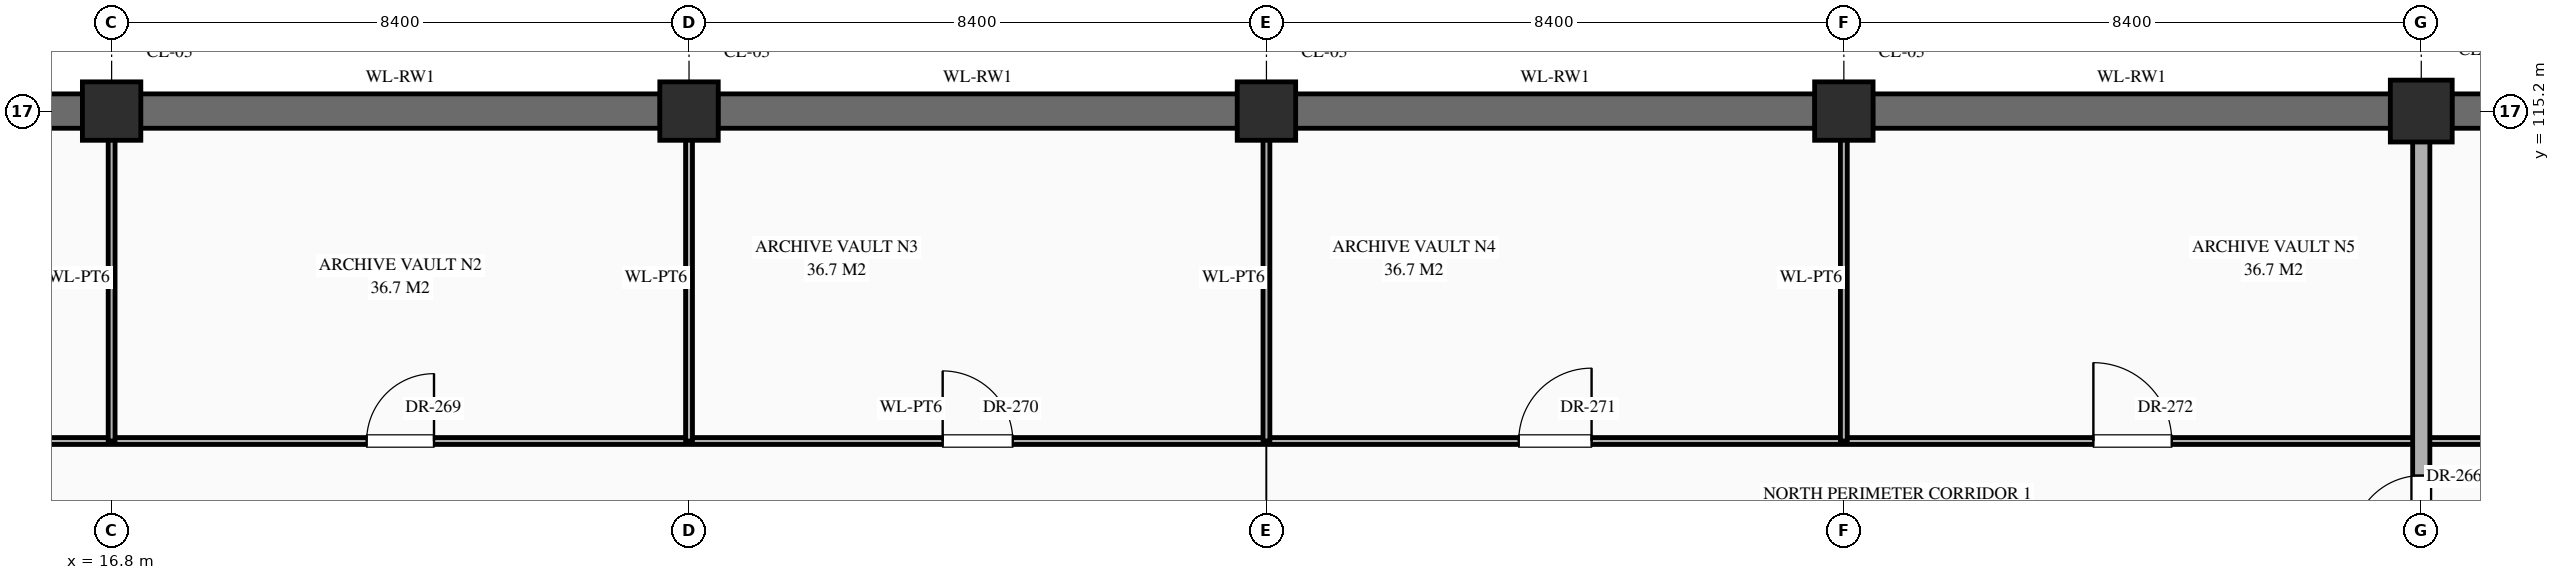
"""IFC4 building model, lengths in metres.
Left out: names, types, materials, properties, quantities, classifications, styles, units other than length and angle.
Written with IfcOpenShell. Run it as: python <this file> out.ifc"""

import sys

from ifc_helpers import new_model, si_unit, direction, frame, frame_2d, origin, origin_2d, place, context, subcontext, project, spatial, rectangle, extrude, element, fill, save


model = new_model("IFC4")
c1 = context("Model", 3, precision=1e-05, world=origin(), true_north=direction((0.0, 1.0)))
c2 = subcontext(c1, "Body", "Model", "MODEL_VIEW")
j1 = project(units=[si_unit("LENGTHUNIT", "METRE"), si_unit("PLANEANGLEUNIT", "RADIAN")], contexts=[c1])
p1 = place(None, origin())
s1 = spatial("IfcSite", under=j1, at=p1, CompositionType="ELEMENT")
p2 = place(p1, origin())
s2 = spatial("IfcBuilding", under=s1, at=p2, CompositionType="ELEMENT")
p3 = place(p2, frame((0.0, 0.0, -10.2)))
s3 = spatial("IfcBuildingStorey", under=s2, at=p3, CompositionType="ELEMENT", Elevation=-10.2)
for number, where, z_axis, x_axis in (
    (1, (16.8, 115.2, 0.0), (0.0, 0.0, 1.0), (1.0, 0.0, 0.0)),
    (2, (25.2, 115.2, 0.0), (0.0, 0.0, 1.0), (1.0, 0.0, 0.0)),
    (3, (33.6, 115.2, 0.0), (0.0, 0.0, 1.0), (1.0, 0.0, 0.0)),
    (4, (42.0, 115.2, 0.0), (0.0, 0.0, 1.0), (1.0, 0.0, 0.0)),
):
    element("IfcColumn", number, at=place(p3, frame(where, z_axis=z_axis, x_axis=x_axis)), inside=s3, PredefinedType="COLUMN", context=c2, shape_type="SweptSolid", body=[
        extrude(rectangle(XDim=0.85, YDim=0.85, at=origin_2d()), origin(), (0.0, 0.0, 1.0), 4.8),
    ])
p4 = place(p3, frame((50.4, 115.2, 0.0), z_axis=(0.0, 0.0, 1.0), x_axis=(1.0, 0.0, 0.0)))
e5 = element("IfcColumn", 5, at=p4, inside=s3, PredefinedType="COLUMN", context=c2, shape_type="SweptSolid", body=[
    extrude(rectangle(XDim=0.9, YDim=0.9, at=origin_2d()), origin(), (0.0, 0.0, 1.0), 4.8),
])
p5 = place(p3, frame((8.82, 115.2, 0.0), z_axis=(0.0, 0.0, 1.0), x_axis=(1.0, 0.0, 0.0)))
e6 = element("IfcWall", 6, at=p5, inside=s3, PredefinedType="USERDEFINED", context=c2, shape_type="SweptSolid", body=[
    extrude(rectangle(XDim=7.56, YDim=0.5, at=frame_2d((3.78, 0.0))), origin(), (0.0, 0.0, 1.0), 4.48),
])
p6 = place(p3, frame((17.22, 115.2, 0.0), z_axis=(0.0, 0.0, 1.0), x_axis=(1.0, 0.0, 0.0)))
e7 = element("IfcWall", 7, at=p6, inside=s3, PredefinedType="USERDEFINED", context=c2, shape_type="SweptSolid", body=[
    extrude(rectangle(XDim=7.56, YDim=0.5, at=frame_2d((3.78, 0.0))), origin(), (0.0, 0.0, 1.0), 4.48),
])
p7 = place(p3, frame((25.62, 115.2, 0.0), z_axis=(0.0, 0.0, 1.0), x_axis=(1.0, 0.0, 0.0)))
e8 = element("IfcWall", 8, at=p7, inside=s3, PredefinedType="USERDEFINED", context=c2, shape_type="SweptSolid", body=[
    extrude(rectangle(XDim=7.56, YDim=0.5, at=frame_2d((3.78, 0.0))), origin(), (0.0, 0.0, 1.0), 4.48),
])
p8 = place(p3, frame((34.02, 115.2, 0.0), z_axis=(0.0, 0.0, 1.0), x_axis=(1.0, 0.0, 0.0)))
e9 = element("IfcWall", 9, at=p8, inside=s3, PredefinedType="USERDEFINED", context=c2, shape_type="SweptSolid", body=[
    extrude(rectangle(XDim=7.56, YDim=0.5, at=frame_2d((3.78, 0.0))), origin(), (0.0, 0.0, 1.0), 4.48),
])
p9 = place(p3, frame((42.42, 115.2, 0.0), z_axis=(0.0, 0.0, 1.0), x_axis=(1.0, 0.0, 0.0)))
e10 = element("IfcWall", 10, at=p9, inside=s3, PredefinedType="USERDEFINED", context=c2, shape_type="SweptSolid", body=[
    extrude(rectangle(XDim=7.535, YDim=0.5, at=frame_2d((3.768, 0.0))), origin(), (0.0, 0.0, 1.0), 4.48),
])
p10 = place(p3, frame((50.845, 115.2, 0.0), z_axis=(0.0, 0.0, 1.0), x_axis=(1.0, 0.0, 0.0)))
e11 = element("IfcWall", 11, at=p10, inside=s3, PredefinedType="USERDEFINED", context=c2, shape_type="SweptSolid", body=[
    extrude(rectangle(XDim=7.51, YDim=0.5, at=frame_2d((3.755, 0.0))), origin(), (0.0, 0.0, 1.0), 4.48),
])
p11 = place(p3, frame((0.04, 110.4, 0.0), z_axis=(0.0, 0.0, 1.0), x_axis=(1.0, 0.0, 0.0)))
e12 = element("IfcWall", 12, at=p11, inside=s3, PredefinedType="STANDARD", context=c2, shape_type="SweptSolid", body=[
    extrude(rectangle(XDim=167.92, YDim=0.1, at=frame_2d((83.96, 0.0))), origin(), (0.0, 0.0, 1.0), 4.48),
])
p12 = place(p11, frame((3.54, 0.0, 0.0)))
e13 = element("IfcOpeningElement", 13, at=p12, cuts=e12, PredefinedType="OPENING", context=c2, shape_type="SweptSolid", body=[
    extrude(rectangle(XDim=1.28, YDim=2.35, at=frame_2d((0.64, 1.175))), frame((0.0, 0.062, 0.0), z_axis=(0.0, -1.0, 0.0), x_axis=(1.0, 0.0, 0.0)), (0.0, 0.0, 1.0), 0.124),
])
p13 = place(p11, frame((12.09, 0.0, 0.0)))
e14 = element("IfcOpeningElement", 14, at=p13, cuts=e12, PredefinedType="OPENING", context=c2, shape_type="SweptSolid", body=[
    extrude(rectangle(XDim=0.94, YDim=2.3, at=frame_2d((0.47, 1.15))), frame((0.0, 0.062, 0.0), z_axis=(0.0, -1.0, 0.0), x_axis=(1.0, 0.0, 0.0)), (0.0, 0.0, 1.0), 0.124),
])
p14 = place(p11, frame((20.47, 0.0, 0.0)))
e15 = element("IfcOpeningElement", 15, at=p14, cuts=e12, PredefinedType="OPENING", context=c2, shape_type="SweptSolid", body=[
    extrude(rectangle(XDim=0.98, YDim=2.35, at=frame_2d((0.49, 1.175))), frame((0.0, 0.062, 0.0), z_axis=(0.0, -1.0, 0.0), x_axis=(1.0, 0.0, 0.0)), (0.0, 0.0, 1.0), 0.124),
])
p15 = place(p11, frame((28.85, 0.0, 0.0)))
e16 = element("IfcOpeningElement", 16, at=p15, cuts=e12, PredefinedType="OPENING", context=c2, shape_type="SweptSolid", body=[
    extrude(rectangle(XDim=1.02, YDim=2.4, at=frame_2d((0.51, 1.2))), frame((0.0, 0.062, 0.0), z_axis=(0.0, -1.0, 0.0), x_axis=(1.0, 0.0, 0.0)), (0.0, 0.0, 1.0), 0.124),
])
p16 = place(p11, frame((37.23, 0.0, 0.0)))
e17 = element("IfcOpeningElement", 17, at=p16, cuts=e12, PredefinedType="OPENING", context=c2, shape_type="SweptSolid", body=[
    extrude(rectangle(XDim=1.06, YDim=2.4, at=frame_2d((0.53, 1.2))), frame((0.0, 0.062, 0.0), z_axis=(0.0, -1.0, 0.0), x_axis=(1.0, 0.0, 0.0)), (0.0, 0.0, 1.0), 0.124),
])
p17 = place(p11, frame((45.59, 0.0, 0.0)))
e18 = element("IfcOpeningElement", 18, at=p17, cuts=e12, PredefinedType="OPENING", context=c2, shape_type="SweptSolid", body=[
    extrude(rectangle(XDim=1.14, YDim=2.4, at=frame_2d((0.57, 1.2))), frame((0.0, 0.062, 0.0), z_axis=(0.0, -1.0, 0.0), x_axis=(1.0, 0.0, 0.0)), (0.0, 0.0, 1.0), 0.124),
])
p18 = place(p11, frame((54.13, 0.0, 0.0)))
e19 = element("IfcOpeningElement", 19, at=p18, cuts=e12, PredefinedType="OPENING", context=c2, shape_type="SweptSolid", body=[
    extrude(rectangle(XDim=0.86, YDim=2.1, at=frame_2d((0.43, 1.05))), frame((0.0, 0.062, 0.0), z_axis=(0.0, -1.0, 0.0), x_axis=(1.0, 0.0, 0.0)), (0.0, 0.0, 1.0), 0.124),
])
p19 = place(p11, frame((62.5, 0.0, 0.0)))
e20 = element("IfcOpeningElement", 20, at=p19, cuts=e12, PredefinedType="OPENING", context=c2, shape_type="SweptSolid", body=[
    extrude(rectangle(XDim=0.92, YDim=2.15, at=frame_2d((0.46, 1.075))), frame((0.0, 0.062, 0.0), z_axis=(0.0, -1.0, 0.0), x_axis=(1.0, 0.0, 0.0)), (0.0, 0.0, 1.0), 0.124),
])
p20 = place(p11, frame((70.88, 0.0, 0.0)))
e21 = element("IfcOpeningElement", 21, at=p20, cuts=e12, PredefinedType="OPENING", context=c2, shape_type="SweptSolid", body=[
    extrude(rectangle(XDim=0.96, YDim=2.2, at=frame_2d((0.48, 1.1))), frame((0.0, 0.062, 0.0), z_axis=(0.0, -1.0, 0.0), x_axis=(1.0, 0.0, 0.0)), (0.0, 0.0, 1.0), 0.124),
])
p21 = place(p11, frame((79.26, 0.0, 0.0)))
e22 = element("IfcOpeningElement", 22, at=p21, cuts=e12, PredefinedType="OPENING", context=c2, shape_type="SweptSolid", body=[
    extrude(rectangle(XDim=1.0, YDim=2.25, at=frame_2d((0.5, 1.125))), frame((0.0, 0.062, 0.0), z_axis=(0.0, -1.0, 0.0), x_axis=(1.0, 0.0, 0.0)), (0.0, 0.0, 1.0), 0.124),
])
p22 = place(p11, frame((87.62, 0.0, 0.0)))
e23 = element("IfcOpeningElement", 23, at=p22, cuts=e12, PredefinedType="OPENING", context=c2, shape_type="SweptSolid", body=[
    extrude(rectangle(XDim=1.08, YDim=2.25, at=frame_2d((0.54, 1.125))), frame((0.0, 0.062, 0.0), z_axis=(0.0, -1.0, 0.0), x_axis=(1.0, 0.0, 0.0)), (0.0, 0.0, 1.0), 0.124),
])
p23 = place(p11, frame((96.0, 0.0, 0.0)))
e24 = element("IfcOpeningElement", 24, at=p23, cuts=e12, PredefinedType="OPENING", context=c2, shape_type="SweptSolid", body=[
    extrude(rectangle(XDim=1.12, YDim=2.25, at=frame_2d((0.56, 1.125))), frame((0.0, 0.062, 0.0), z_axis=(0.0, -1.0, 0.0), x_axis=(1.0, 0.0, 0.0)), (0.0, 0.0, 1.0), 0.124),
])
p24 = place(p11, frame((104.38, 0.0, 0.0)))
e25 = element("IfcOpeningElement", 25, at=p24, cuts=e12, PredefinedType="OPENING", context=c2, shape_type="SweptSolid", body=[
    extrude(rectangle(XDim=1.16, YDim=2.3, at=frame_2d((0.58, 1.15))), frame((0.0, 0.062, 0.0), z_axis=(0.0, -1.0, 0.0), x_axis=(1.0, 0.0, 0.0)), (0.0, 0.0, 1.0), 0.124),
])
p25 = place(p11, frame((112.76, 0.0, 0.0)))
e26 = element("IfcOpeningElement", 26, at=p25, cuts=e12, PredefinedType="OPENING", context=c2, shape_type="SweptSolid", body=[
    extrude(rectangle(XDim=1.2, YDim=2.35, at=frame_2d((0.6, 1.175))), frame((0.0, 0.062, 0.0), z_axis=(0.0, -1.0, 0.0), x_axis=(1.0, 0.0, 0.0)), (0.0, 0.0, 1.0), 0.124),
])
p26 = place(p11, frame((121.14, 0.0, 0.0)))
e27 = element("IfcOpeningElement", 27, at=p26, cuts=e12, PredefinedType="OPENING", context=c2, shape_type="SweptSolid", body=[
    extrude(rectangle(XDim=1.24, YDim=2.3, at=frame_2d((0.62, 1.15))), frame((0.0, 0.062, 0.0), z_axis=(0.0, -1.0, 0.0), x_axis=(1.0, 0.0, 0.0)), (0.0, 0.0, 1.0), 0.124),
])
p27 = place(p11, frame((129.52, 0.0, 0.0)))
e28 = element("IfcOpeningElement", 28, at=p27, cuts=e12, PredefinedType="OPENING", context=c2, shape_type="SweptSolid", body=[
    extrude(rectangle(XDim=1.28, YDim=2.35, at=frame_2d((0.64, 1.175))), frame((0.0, 0.062, 0.0), z_axis=(0.0, -1.0, 0.0), x_axis=(1.0, 0.0, 0.0)), (0.0, 0.0, 1.0), 0.124),
])
p28 = place(p11, frame((138.09, 0.0, 0.0)))
e29 = element("IfcOpeningElement", 29, at=p28, cuts=e12, PredefinedType="OPENING", context=c2, shape_type="SweptSolid", body=[
    extrude(rectangle(XDim=0.94, YDim=2.3, at=frame_2d((0.47, 1.15))), frame((0.0, 0.062, 0.0), z_axis=(0.0, -1.0, 0.0), x_axis=(1.0, 0.0, 0.0)), (0.0, 0.0, 1.0), 0.124),
])
p29 = place(p11, frame((146.47, 0.0, 0.0)))
e30 = element("IfcOpeningElement", 30, at=p29, cuts=e12, PredefinedType="OPENING", context=c2, shape_type="SweptSolid", body=[
    extrude(rectangle(XDim=0.98, YDim=2.35, at=frame_2d((0.49, 1.175))), frame((0.0, 0.062, 0.0), z_axis=(0.0, -1.0, 0.0), x_axis=(1.0, 0.0, 0.0)), (0.0, 0.0, 1.0), 0.124),
])
p30 = place(p11, frame((154.85, 0.0, 0.0)))
e31 = element("IfcOpeningElement", 31, at=p30, cuts=e12, PredefinedType="OPENING", context=c2, shape_type="SweptSolid", body=[
    extrude(rectangle(XDim=1.02, YDim=2.4, at=frame_2d((0.51, 1.2))), frame((0.0, 0.062, 0.0), z_axis=(0.0, -1.0, 0.0), x_axis=(1.0, 0.0, 0.0)), (0.0, 0.0, 1.0), 0.124),
])
p31 = place(p11, frame((163.21, 0.0, 0.0)))
e32 = element("IfcOpeningElement", 32, at=p31, cuts=e12, PredefinedType="OPENING", context=c2, shape_type="SweptSolid", body=[
    extrude(rectangle(XDim=1.06, YDim=2.4, at=frame_2d((0.53, 1.2))), frame((0.0, 0.062, 0.0), z_axis=(0.0, -1.0, 0.0), x_axis=(1.0, 0.0, 0.0)), (0.0, 0.0, 1.0), 0.124),
])
for number, where, z_axis, x_axis in (
    (33, (16.8, 110.4, 0.0), (0.0, 0.0, 1.0), (0.0, 1.0, 0.0)),
    (34, (25.2, 110.4, 0.0), (0.0, 0.0, 1.0), (0.0, 1.0, 0.0)),
    (35, (33.6, 110.4, 0.0), (0.0, 0.0, 1.0), (0.0, 1.0, 0.0)),
    (36, (42.0, 110.4, 0.0), (0.0, 0.0, 1.0), (0.0, 1.0, 0.0)),
):
    element("IfcWall", number, at=place(p3, frame(where, z_axis=z_axis, x_axis=x_axis)), inside=s3, PredefinedType="STANDARD", context=c2, shape_type="SweptSolid", body=[
        extrude(rectangle(XDim=4.76, YDim=0.1, at=frame_2d((2.38, 0.0))), origin(), (0.0, 0.0, 1.0), 3.73),
    ])
p32 = place(p3, frame((50.4, 91.2, 0.0), z_axis=(0.0, 0.0, 1.0), x_axis=(0.0, 1.0, 0.0)))
e37 = element("IfcWall", 37, at=p32, inside=s3, PredefinedType="STANDARD", context=c2, shape_type="SweptSolid", body=[
    extrude(rectangle(XDim=23.96, YDim=0.25, at=frame_2d((11.98, 0.0))), origin(), (0.0, 0.0, 1.0), 3.73),
])
p33 = place(p32, frame((0.502, 0.0, 0.0)))
e38 = element("IfcOpeningElement", 38, at=p33, cuts=e37, PredefinedType="OPENING", context=c2, shape_type="SweptSolid", body=[
    extrude(rectangle(XDim=1.0, YDim=2.2, at=frame_2d((0.5, 1.1))), frame((0.0, 0.137, 0.0), z_axis=(0.0, -1.0, 0.0), x_axis=(1.0, 0.0, 0.0)), (0.0, 0.0, 1.0), 0.274),
])
p34 = place(p32, frame((10.522, 0.0, 0.0)))
e39 = element("IfcOpeningElement", 39, at=p34, cuts=e37, PredefinedType="OPENING", context=c2, shape_type="SweptSolid", body=[
    extrude(rectangle(XDim=0.95, YDim=2.15, at=frame_2d((0.475, 1.075))), frame((0.0, 0.137, 0.0), z_axis=(0.0, -1.0, 0.0), x_axis=(1.0, 0.0, 0.0)), (0.0, 0.0, 1.0), 0.274),
])
p35 = place(p32, frame((3.323, 0.0, 0.0)))
e40 = element("IfcOpeningElement", 40, at=p35, cuts=e37, PredefinedType="OPENING", context=c2, shape_type="SweptSolid", body=[
    extrude(rectangle(XDim=0.95, YDim=2.15, at=frame_2d((0.475, 1.075))), frame((0.0, 0.137, 0.0), z_axis=(0.0, -1.0, 0.0), x_axis=(1.0, 0.0, 0.0)), (0.0, 0.0, 1.0), 0.274),
])
p36 = place(p32, frame((17.698, 0.0, 0.0)))
e41 = element("IfcOpeningElement", 41, at=p36, cuts=e37, PredefinedType="OPENING", context=c2, shape_type="SweptSolid", body=[
    extrude(rectangle(XDim=1.0, YDim=2.2, at=frame_2d((0.5, 1.1))), frame((0.0, 0.137, 0.0), z_axis=(0.0, -1.0, 0.0), x_axis=(1.0, 0.0, 0.0)), (0.0, 0.0, 1.0), 0.274),
])
p37 = place(p36, origin())
e42 = element("IfcDoor", 42, at=p37, inside=s3, OperationType="SINGLE_SWING_LEFT", PredefinedType="DOOR", context=c2, shape_type="SweptSolid", body=[
    extrude(rectangle(XDim=1.0, YDim=2.2, at=frame_2d((0.5, 1.1))), frame((0.0, 0.025, 0.0), z_axis=(0.0, -1.0, 0.0), x_axis=(1.0, 0.0, 0.0)), (0.0, 0.0, 1.0), 0.05),
])
fill(e41, e42)
p38 = place(p14, origin())
e43 = element("IfcDoor", 43, at=p38, inside=s3, OperationType="SINGLE_SWING_RIGHT", PredefinedType="DOOR", context=c2, shape_type="SweptSolid", body=[
    extrude(rectangle(XDim=0.98, YDim=2.35, at=frame_2d((0.49, 1.175))), frame((0.0, 0.025, 0.0), z_axis=(0.0, -1.0, 0.0), x_axis=(1.0, 0.0, 0.0)), (0.0, 0.0, 1.0), 0.05),
])
fill(e15, e43)
p39 = place(p15, origin())
e44 = element("IfcDoor", 44, at=p39, inside=s3, OperationType="SINGLE_SWING_LEFT", PredefinedType="DOOR", context=c2, shape_type="SweptSolid", body=[
    extrude(rectangle(XDim=1.02, YDim=2.4, at=frame_2d((0.51, 1.2))), frame((0.0, 0.025, 0.0), z_axis=(0.0, -1.0, 0.0), x_axis=(1.0, 0.0, 0.0)), (0.0, 0.0, 1.0), 0.05),
])
fill(e16, e44)
p40 = place(p16, origin())
e45 = element("IfcDoor", 45, at=p40, inside=s3, OperationType="SINGLE_SWING_RIGHT", PredefinedType="DOOR", context=c2, shape_type="SweptSolid", body=[
    extrude(rectangle(XDim=1.06, YDim=2.4, at=frame_2d((0.53, 1.2))), frame((0.0, 0.025, 0.0), z_axis=(0.0, -1.0, 0.0), x_axis=(1.0, 0.0, 0.0)), (0.0, 0.0, 1.0), 0.05),
])
fill(e17, e45)
p41 = place(p17, origin())
e46 = element("IfcDoor", 46, at=p41, inside=s3, OperationType="SINGLE_SWING_LEFT", PredefinedType="DOOR", context=c2, shape_type="SweptSolid", body=[
    extrude(rectangle(XDim=1.14, YDim=2.4, at=frame_2d((0.57, 1.2))), frame((0.0, 0.025, 0.0), z_axis=(0.0, -1.0, 0.0), x_axis=(1.0, 0.0, 0.0)), (0.0, 0.0, 1.0), 0.05),
])
fill(e18, e46)
save(model, sys.argv[1])
